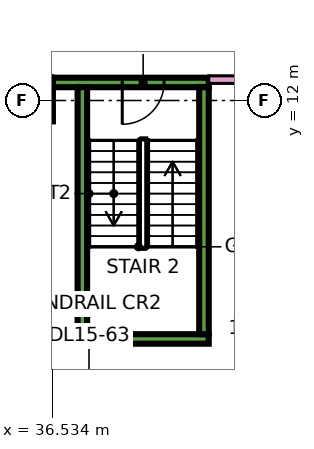
"""IFC4 building model, lengths in metres.
Left out: names, types, materials, properties, quantities, classifications, styles, units other than length and angle.
Written with IfcOpenShell. Run it as: python <this file> out.ifc"""

import sys

from ifc_helpers import new_model, si_unit, direction, frame, frame_2d, origin, origin_2d, place, context, subcontext, project, spatial, rectangle, extrude, element, fill, save


model = new_model("IFC4")
c1 = context("Model", 3, precision=1e-05, world=origin(), true_north=direction((0.0, 1.0)))
c2 = subcontext(c1, "Body", "Model", "MODEL_VIEW")
j1 = project(units=[si_unit("LENGTHUNIT", "METRE"), si_unit("PLANEANGLEUNIT", "RADIAN")], contexts=[c1])
p1 = place(None, origin())
s1 = spatial("IfcSite", under=j1, at=p1, CompositionType="ELEMENT")
p2 = place(p1, origin())
s2 = spatial("IfcBuilding", under=s1, at=p2, CompositionType="ELEMENT")
p3 = place(p2, frame((0.0, 0.0, 71.4)))
s3 = spatial("IfcBuildingStorey", under=s2, at=p3, CompositionType="ELEMENT", Elevation=71.4)
p4 = place(p3, frame((36.0, 12.0, 0.0), z_axis=(0.0, 0.0, 1.0), x_axis=(1.0, 0.0, 0.0)))
e1 = element("IfcColumn", 1, at=p4, inside=s3, PredefinedType="COLUMN", context=c2, shape_type="SweptSolid", body=[
    extrude(rectangle(XDim=1.1, YDim=1.1, at=origin_2d()), origin(), (0.0, 0.0, 1.0), 3.75),
])
p5 = place(p3, frame((37.2, 5.725, 0.0), z_axis=(0.0, 0.0, 1.0), x_axis=(1.0, 0.0, 0.0)))
e2 = element("IfcWall", 2, at=p5, inside=s3, PredefinedType="SHEAR", context=c2, shape_type="SweptSolid", body=[
    extrude(rectangle(XDim=3.45, YDim=0.25, at=frame_2d((1.725, 0.0))), origin(), (0.0, 0.0, 1.0), 3.75),
])
p6 = place(p3, frame((36.55, 12.475, 0.0), z_axis=(0.0, 0.0, 1.0), x_axis=(1.0, 0.0, 0.0)))
e3 = element("IfcWall", 3, at=p6, inside=s3, PredefinedType="SHEAR", context=c2, shape_type="SweptSolid", body=[
    extrude(rectangle(XDim=4.1, YDim=0.25, at=frame_2d((2.05, 0.0))), origin(), (0.0, 0.0, 1.0), 3.75),
])
p7 = place(p6, frame((1.825, 0.0, 0.0)))
e4 = element("IfcOpeningElement", 4, at=p7, cuts=e3, PredefinedType="OPENING", context=c2, shape_type="SweptSolid", body=[
    extrude(rectangle(XDim=1.1, YDim=2.2, at=frame_2d((0.55, 1.1))), frame((0.0, 0.135, 0.0), z_axis=(0.0, -1.0, 0.0), x_axis=(1.0, 0.0, 0.0)), (0.0, 0.0, 1.0), 0.27),
])
for number, where, z_axis, x_axis in (
    (5, (37.325, 5.85, 0.0), (0.0, 0.0, 1.0), (0.0, 1.0, 0.0)),
    (6, (40.525, 5.85, 0.0), (0.0, 0.0, 1.0), (0.0, 1.0, 0.0)),
):
    element("IfcWall", number, at=place(p3, frame(where, z_axis=z_axis, x_axis=x_axis)), inside=s3, PredefinedType="SHEAR", context=c2, shape_type="SweptSolid", body=[
        extrude(rectangle(XDim=6.5, YDim=0.25, at=frame_2d((3.25, 0.0))), origin(), (0.0, 0.0, 1.0), 3.75),
    ])
p8 = place(p3, frame((34.0, 12.55, 0.0), z_axis=(0.0, 0.0, 1.0), x_axis=(1.0, 0.0, 0.0)))
e7 = element("IfcWall", 7, at=p8, inside=s3, PredefinedType="PARTITIONING", context=c2, shape_type="SweptSolid", body=[
    extrude(rectangle(XDim=2.551, YDim=0.2, at=frame_2d((1.275, 0.0))), origin(), (0.0, 0.0, 1.0), 3.35),
])
p9 = place(p3, frame((40.65, 12.55, 0.0), z_axis=(0.0, 0.0, 1.0), x_axis=(1.0, 0.0, 0.0)))
e8 = element("IfcWall", 8, at=p9, inside=s3, PredefinedType="PARTITIONING", context=c2, shape_type="SweptSolid", body=[
    extrude(rectangle(XDim=31.276, YDim=0.2, at=frame_2d((15.638, 0.0))), origin(), (0.0, 0.0, 1.0), 3.35),
])
p10 = place(p9, frame((23.1, 0.0, 0.0)))
e9 = element("IfcOpeningElement", 9, at=p10, cuts=e8, PredefinedType="OPENING", context=c2, shape_type="SweptSolid", body=[
    extrude(rectangle(XDim=1.0, YDim=2.1, at=frame_2d((0.5, 1.05))), frame((0.0, 0.11, 0.0), z_axis=(0.0, -1.0, 0.0), x_axis=(1.0, 0.0, 0.0)), (0.0, 0.0, 1.0), 0.22),
])
p11 = place(p9, frame((1.05, 0.0, 0.0)))
e10 = element("IfcOpeningElement", 10, at=p11, cuts=e8, PredefinedType="OPENING", context=c2, shape_type="SweptSolid", body=[
    extrude(rectangle(XDim=1.0, YDim=2.1, at=frame_2d((0.5, 1.05))), frame((0.0, 0.11, 0.0), z_axis=(0.0, -1.0, 0.0), x_axis=(1.0, 0.0, 0.0)), (0.0, 0.0, 1.0), 0.22),
])
p12 = place(p7, frame((1.1, 0.0, 0.0), z_axis=(0.0, 0.0, 1.0), x_axis=(-1.0, 0.0, 0.0)))
e11 = element("IfcDoor", 11, at=p12, inside=s3, OperationType="SINGLE_SWING_LEFT", PredefinedType="DOOR", context=c2, shape_type="SweptSolid", body=[
    extrude(rectangle(XDim=1.1, YDim=2.2, at=frame_2d((0.55, 1.1))), frame((0.0, 0.025, 0.0), z_axis=(0.0, -1.0, 0.0), x_axis=(1.0, 0.0, 0.0)), (0.0, 0.0, 1.0), 0.05),
])
fill(e4, e11)
save(model, sys.argv[1])
